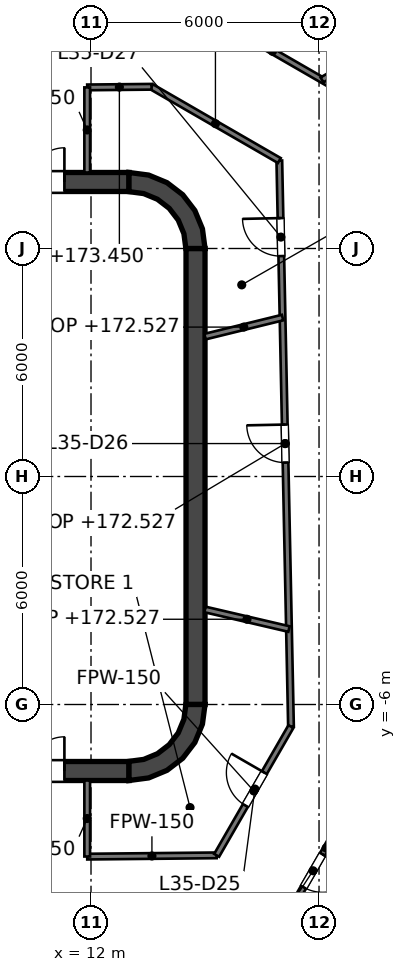
"""IFC4 building model, lengths in metres.
Left out: names, types, materials, properties, quantities, classifications, styles, units other than length and angle.
Written with IfcOpenShell. Run it as: python <this file> out.ifc"""

import sys

from ifc_helpers import new_model, si_unit, direction, frame, frame_2d, origin, place, context, subcontext, project, spatial, polyline, rectangle, outline, extrude, element, fill, save


model = new_model("IFC4")
c1 = context("Model", 3, precision=1e-05, world=origin(), true_north=direction((0.0, 1.0)))
c2 = subcontext(c1, "Body", "Model", "MODEL_VIEW")
j1 = project(units=[si_unit("LENGTHUNIT", "METRE"), si_unit("PLANEANGLEUNIT", "RADIAN")], contexts=[c1])
p1 = place(None, origin())
s1 = spatial("IfcSite", under=j1, at=p1, CompositionType="ELEMENT")
p2 = place(p1, origin())
s2 = spatial("IfcBuilding", under=s1, at=p2, CompositionType="ELEMENT")
p3 = place(p2, frame((0.0, 0.0, 169.6)))
s3 = spatial("IfcBuildingStorey", under=s2, at=p3, CompositionType="ELEMENT", Elevation=169.6)
p4 = place(p3, frame((-13.0, 7.75, 0.0), z_axis=(0.0, 0.0, 1.0), x_axis=(1.0, 0.0, 0.0)))
e1 = element("IfcWall", 1, at=p4, inside=s3, PredefinedType="SHEAR", context=c2, shape_type="SweptSolid", body=[
    extrude(rectangle(XDim=26.0, YDim=0.5, at=frame_2d((13.0, 0.0))), origin(), (0.0, 0.0, 1.0), 4.0),
])
p5 = place(p4, frame((1.7, 0.0, 0.0)))
e2 = element("IfcOpeningElement", 2, at=p5, cuts=e1, PredefinedType="OPENING", context=c2, shape_type="SweptSolid", body=[
    extrude(rectangle(XDim=1.8, YDim=2.1, at=frame_2d((0.9, 1.05))), frame((0.0, 0.25, 0.0), z_axis=(0.0, -1.0, 0.0), x_axis=(1.0, 0.0, 0.0)), (0.0, 0.0, 1.0), 0.5),
])
p6 = place(p4, frame((22.5, 0.0, 0.0)))
e3 = element("IfcOpeningElement", 3, at=p6, cuts=e1, PredefinedType="OPENING", context=c2, shape_type="SweptSolid", body=[
    extrude(rectangle(XDim=1.8, YDim=2.1, at=frame_2d((0.9, 1.05))), frame((0.0, 0.25, 0.0), z_axis=(0.0, -1.0, 0.0), x_axis=(1.0, 0.0, 0.0)), (0.0, 0.0, 1.0), 0.5),
])
p7 = place(p3, frame((-13.0, -7.75, 0.0), z_axis=(0.0, 0.0, 1.0), x_axis=(1.0, 0.0, 0.0)))
e4 = element("IfcWall", 4, at=p7, inside=s3, PredefinedType="SHEAR", context=c2, shape_type="SweptSolid", body=[
    extrude(rectangle(XDim=26.0, YDim=0.5, at=frame_2d((13.0, 0.0))), origin(), (0.0, 0.0, 1.0), 4.0),
])
p8 = place(p7, frame((1.7, 0.0, 0.0)))
e5 = element("IfcOpeningElement", 5, at=p8, cuts=e4, PredefinedType="OPENING", context=c2, shape_type="SweptSolid", body=[
    extrude(rectangle(XDim=1.8, YDim=2.1, at=frame_2d((0.9, 1.05))), frame((0.0, 0.25, 0.0), z_axis=(0.0, -1.0, 0.0), x_axis=(1.0, 0.0, 0.0)), (0.0, 0.0, 1.0), 0.5),
])
p9 = place(p7, frame((22.5, 0.0, 0.0)))
e6 = element("IfcOpeningElement", 6, at=p9, cuts=e4, PredefinedType="OPENING", context=c2, shape_type="SweptSolid", body=[
    extrude(rectangle(XDim=1.8, YDim=2.1, at=frame_2d((0.9, 1.05))), frame((0.0, 0.25, 0.0), z_axis=(0.0, -1.0, 0.0), x_axis=(1.0, 0.0, 0.0)), (0.0, 0.0, 1.0), 0.5),
])
p10 = place(p3, frame((14.75, -6.0, 0.0), z_axis=(0.0, 0.0, 1.0), x_axis=(0.0, 1.0, 0.0)))
e7 = element("IfcWall", 7, at=p10, inside=s3, PredefinedType="SHEAR", context=c2, shape_type="SweptSolid", body=[
    extrude(rectangle(XDim=12.0, YDim=0.5, at=frame_2d((6.0, 0.0))), origin(), (0.0, 0.0, 1.0), 4.0),
])
p11 = place(p3, origin())
e8 = element("IfcWall", 8, at=p11, inside=s3, PredefinedType="SHEAR", context=c2, shape_type="SweptSolid", body=[
    extrude(outline(polyline([(13.0, 8.0), (13.0, 7.496), (13.387, 7.445), (13.748, 7.295), (14.058, 7.058), (14.295, 6.748), (14.445, 6.387), (14.496, 6.0), (15.0, 6.0), (14.932, 6.518), (14.732, 7.0), (14.414, 7.414), (14.0, 7.732), (13.518, 7.932), (13.0, 8.0)])), origin(), (0.0, 0.0, 1.0), 4.0),
])
e9 = element("IfcWall", 9, at=p11, inside=s3, PredefinedType="SHEAR", context=c2, shape_type="SweptSolid", body=[
    extrude(outline(polyline([(15.0, -6.0), (14.496, -6.0), (14.445, -6.387), (14.295, -6.748), (14.058, -7.058), (13.748, -7.295), (13.387, -7.445), (13.0, -7.496), (13.0, -8.0), (13.518, -7.932), (14.0, -7.732), (14.414, -7.414), (14.732, -7.0), (14.932, -6.518), (15.0, -6.0)])), origin(), (0.0, 0.0, 1.0), 4.0),
])
p12 = place(p3, frame((11.8, -7.5, 0.0), z_axis=(0.0, 0.0, 1.0), x_axis=(0.0, 1.0, 0.0)))
e10 = element("IfcWall", 10, at=p12, inside=s3, PredefinedType="SOLIDWALL", context=c2, shape_type="SweptSolid", body=[
    extrude(rectangle(XDim=15.0, YDim=0.4, at=frame_2d((7.5, 0.0))), origin(), (0.0, 0.0, 1.0), 3.85),
])
p13 = place(p12, frame((11.3, 0.0, 0.0)))
e11 = element("IfcOpeningElement", 11, at=p13, cuts=e10, PredefinedType="OPENING", context=c2, shape_type="SweptSolid", body=[
    extrude(rectangle(XDim=1.1, YDim=2.1, at=frame_2d((0.55, 1.05))), frame((0.0, 0.2, 0.0), z_axis=(0.0, -1.0, 0.0), x_axis=(1.0, 0.0, 0.0)), (0.0, 0.0, 1.0), 0.4),
])
p14 = place(p12, frame((8.4, 0.0, 0.0)))
e12 = element("IfcOpeningElement", 12, at=p14, cuts=e10, PredefinedType="OPENING", context=c2, shape_type="SweptSolid", body=[
    extrude(rectangle(XDim=1.1, YDim=2.1, at=frame_2d((0.55, 1.05))), frame((0.0, 0.2, 0.0), z_axis=(0.0, -1.0, 0.0), x_axis=(1.0, 0.0, 0.0)), (0.0, 0.0, 1.0), 0.4),
])
p15 = place(p12, frame((5.5, 0.0, 0.0)))
e13 = element("IfcOpeningElement", 13, at=p15, cuts=e10, PredefinedType="OPENING", context=c2, shape_type="SweptSolid", body=[
    extrude(rectangle(XDim=1.1, YDim=2.1, at=frame_2d((0.55, 1.05))), frame((0.0, 0.2, 0.0), z_axis=(0.0, -1.0, 0.0), x_axis=(1.0, 0.0, 0.0)), (0.0, 0.0, 1.0), 0.4),
])
p16 = place(p12, frame((13.697, 0.0, 0.0)))
e14 = element("IfcOpeningElement", 14, at=p16, cuts=e10, PredefinedType="OPENING", context=c2, shape_type="SweptSolid", body=[
    extrude(rectangle(XDim=0.9, YDim=2.1, at=frame_2d((0.45, 1.05))), frame((0.0, 0.2, 0.0), z_axis=(0.0, -1.0, 0.0), x_axis=(1.0, 0.0, 0.0)), (0.0, 0.0, 1.0), 0.4),
])
p17 = place(p12, frame((0.403, 0.0, 0.0)))
e15 = element("IfcOpeningElement", 15, at=p17, cuts=e10, PredefinedType="OPENING", context=c2, shape_type="SweptSolid", body=[
    extrude(rectangle(XDim=0.9, YDim=2.1, at=frame_2d((0.45, 1.05))), frame((0.0, 0.2, 0.0), z_axis=(0.0, -1.0, 0.0), x_axis=(1.0, 0.0, 0.0)), (0.0, 0.0, 1.0), 0.4),
])
e16 = element("IfcWall", 16, at=p11, inside=s3, PredefinedType="SOLIDWALL", context=c2, shape_type="SweptSolid", body=[
    extrude(outline(polyline([(12.0, -5.675), (12.0, -5.925), (14.25, -5.925), (14.5, -5.925), (14.5, -5.675), (14.5, -3.025), (14.5, -2.775), (14.5, -0.125), (14.5, 0.125), (14.5, 2.775), (14.5, 3.025), (14.5, 5.675), (14.5, 5.925), (14.25, 5.925), (12.0, 5.925), (12.0, 5.675), (14.25, 5.675), (14.25, 3.025), (12.0, 3.025), (12.0, 2.775), (14.25, 2.775), (14.25, 0.125), (12.0, 0.125), (12.0, -0.125), (14.25, -0.125), (14.25, -2.775), (12.0, -2.775), (12.0, -3.025), (14.25, -3.025), (14.25, -5.675), (12.0, -5.675)])), origin(), (0.0, 0.0, 1.0), 3.85),
])
p18 = place(p3, frame((16.955, 8.314, 0.0), z_axis=(0.0, 0.0, 1.0), x_axis=(0.020631568882, -0.999787146529, 0.0)))
e17 = element("IfcWall", 17, at=p18, inside=s3, PredefinedType="PARTITIONING", context=c2, shape_type="SweptSolid", body=[
    extrude(rectangle(XDim=14.898, YDim=0.15, at=frame_2d((7.449, 0.0))), origin(), (0.0, 0.0, 1.0), 2.927),
])
p19 = place(p18, frame((6.949, 0.0, 0.0)))
e18 = element("IfcOpeningElement", 18, at=p19, cuts=e17, PredefinedType="OPENING", context=c2, shape_type="SweptSolid", body=[
    extrude(rectangle(XDim=1.0, YDim=2.1, at=frame_2d((0.5, 1.05))), frame((0.0, 0.075, 0.0), z_axis=(0.0, -1.0, 0.0), x_axis=(1.0, 0.0, 0.0)), (0.0, 0.0, 1.0), 0.15),
])
p20 = place(p18, frame((1.514, 0.0, 0.0)))
e19 = element("IfcOpeningElement", 19, at=p20, cuts=e17, PredefinedType="OPENING", context=c2, shape_type="SweptSolid", body=[
    extrude(rectangle(XDim=1.0, YDim=2.1, at=frame_2d((0.5, 1.05))), frame((0.0, 0.075, 0.0), z_axis=(0.0, -1.0, 0.0), x_axis=(1.0, 0.0, 0.0)), (0.0, 0.0, 1.0), 0.15),
])
p21 = place(p3, frame((13.593, 10.256, 0.0), z_axis=(0.0, 0.0, 1.0), x_axis=(0.86597823907, -0.500081682786, 0.0)))
e20 = element("IfcWall", 20, at=p21, inside=s3, PredefinedType="PARTITIONING", context=c2, shape_type="SweptSolid", body=[
    extrude(rectangle(XDim=3.883, YDim=0.15, at=frame_2d((1.941, 0.0))), origin(), (0.0, 0.0, 1.0), 2.995),
])
p22 = place(p3, frame((14.225, 12.662, 0.0), z_axis=(0.0, 0.0, 1.0), x_axis=(0.865969566972, -0.500096699728, 0.0)))
e21 = element("IfcWall", 21, at=p22, inside=s3, PredefinedType="PARTITIONING", context=c2, shape_type="SweptSolid", body=[
    extrude(rectangle(XDim=5.891, YDim=0.15, at=frame_2d((2.946, 0.0))), origin(), (0.0, 0.0, 1.0), 2.995),
])
p23 = place(p3, frame((15.0, -3.499, 0.0), z_axis=(0.0, 0.0, 1.0), x_axis=(0.973869783381, -0.22710712234, 0.0)))
e22 = element("IfcWall", 22, at=p23, inside=s3, PredefinedType="PARTITIONING", context=c2, shape_type="SweptSolid", body=[
    extrude(rectangle(XDim=2.268, YDim=0.15, at=frame_2d((1.134, 0.0))), origin(), (0.0, 0.0, 1.0), 2.927),
])
p24 = place(p3, frame((11.9, -10.003, 0.0), z_axis=(0.0, 0.0, 1.0), x_axis=(0.999951786456, 0.009819611121, 0.0)))
e23 = element("IfcWall", 23, at=p24, inside=s3, PredefinedType="PARTITIONING", context=c2, shape_type="SweptSolid", body=[
    extrude(rectangle(XDim=3.406, YDim=0.15, at=frame_2d((1.703, 0.0))), origin(), (0.0, 0.0, 1.0), 2.995),
])
p25 = place(p3, frame((11.9, 10.239, 0.0), z_axis=(0.0, 0.0, 1.0), x_axis=(0.999951931166, 0.009804863925, 0.0)))
e24 = element("IfcWall", 24, at=p25, inside=s3, PredefinedType="PARTITIONING", context=c2, shape_type="SweptSolid", body=[
    extrude(rectangle(XDim=1.693, YDim=0.15, at=frame_2d((0.847, 0.0))), origin(), (0.0, 0.0, 1.0), 3.85),
])
p26 = place(p3, frame((15.0, 3.681, 0.0), z_axis=(0.0, 0.0, 1.0), x_axis=(0.971118944767, 0.238595882433, 0.0)))
e25 = element("IfcWall", 25, at=p26, inside=s3, PredefinedType="PARTITIONING", context=c2, shape_type="SweptSolid", body=[
    extrude(rectangle(XDim=2.101, YDim=0.15, at=frame_2d((1.05, 0.0))), origin(), (0.0, 0.0, 1.0), 2.927),
])
p27 = place(p3, frame((18.078, 10.437, 0.0), z_axis=(0.0, 0.0, 1.0), x_axis=(0.865997546841, 0.500048246539, 0.0)))
e26 = element("IfcWall", 26, at=p27, inside=s3, PredefinedType="PARTITIONING", context=c2, shape_type="SweptSolid", body=[
    extrude(rectangle(XDim=7.698, YDim=0.15, at=frame_2d((3.849, 0.0))), origin(), (0.0, 0.0, 1.0), 3.152),
])
p28 = place(p3, frame((16.7, -12.355, 0.0), z_axis=(0.0, 0.0, 1.0), x_axis=(0.499651425435, 0.866226559891, 0.0)))
e27 = element("IfcWall", 27, at=p28, inside=s3, PredefinedType="PARTITIONING", context=c2, shape_type="SweptSolid", body=[
    extrude(rectangle(XDim=5.951, YDim=0.15, at=frame_2d((2.976, 0.0))), origin(), (0.0, 0.0, 1.0), 2.995),
])
p29 = place(p28, frame((1.786, 0.0, 0.0)))
e28 = element("IfcOpeningElement", 28, at=p29, cuts=e27, PredefinedType="OPENING", context=c2, shape_type="SweptSolid", body=[
    extrude(rectangle(XDim=1.0, YDim=2.1, at=frame_2d((0.5, 1.05))), frame((0.0, 0.075, 0.0), z_axis=(0.0, -1.0, 0.0), x_axis=(1.0, 0.0, 0.0)), (0.0, 0.0, 1.0), 0.15),
])
p30 = place(p3, frame((15.306, -9.969, 0.0), z_axis=(0.0, 0.0, 1.0), x_axis=(0.499690037699, 0.866204286658, 0.0)))
e29 = element("IfcWall", 29, at=p30, inside=s3, PredefinedType="PARTITIONING", context=c2, shape_type="SweptSolid", body=[
    extrude(rectangle(XDim=3.912, YDim=0.15, at=frame_2d((1.956, 0.0))), origin(), (0.0, 0.0, 1.0), 2.995),
])
p31 = place(p30, frame((1.513, 0.0, 0.0)))
e30 = element("IfcOpeningElement", 30, at=p31, cuts=e29, PredefinedType="OPENING", context=c2, shape_type="SweptSolid", body=[
    extrude(rectangle(XDim=1.0, YDim=2.1, at=frame_2d((0.5, 1.05))), frame((0.0, 0.075, 0.0), z_axis=(0.0, -1.0, 0.0), x_axis=(1.0, 0.0, 0.0)), (0.0, 0.0, 1.0), 0.15),
])
p32 = place(p3, frame((11.9, -10.0, 0.0), z_axis=(0.0, 0.0, 1.0), x_axis=(0.0, 1.0, 0.0)))
e31 = element("IfcWall", 31, at=p32, inside=s3, PredefinedType="PARTITIONING", context=c2, shape_type="SweptSolid", body=[
    extrude(rectangle(XDim=2.0, YDim=0.15, at=frame_2d((1.0, 0.0))), origin(), (0.0, 0.0, 1.0), 2.995),
])
p33 = place(p3, frame((11.9, 8.0, 0.0), z_axis=(0.0, 0.0, 1.0), x_axis=(0.0, 1.0, 0.0)))
e32 = element("IfcWall", 32, at=p33, inside=s3, PredefinedType="PARTITIONING", context=c2, shape_type="SweptSolid", body=[
    extrude(rectangle(XDim=2.239, YDim=0.15, at=frame_2d((1.12, 0.0))), origin(), (0.0, 0.0, 1.0), 2.995),
])
p34 = place(p13, origin())
e33 = element("IfcDoor", 33, at=p34, inside=s3, OperationType="DOUBLE_DOOR_SLIDING", PredefinedType="DOOR", context=c2, shape_type="SweptSolid", body=[
    extrude(rectangle(XDim=1.1, YDim=2.1, at=frame_2d((0.55, 1.05))), frame((0.0, 0.025, 0.0), z_axis=(0.0, -1.0, 0.0), x_axis=(1.0, 0.0, 0.0)), (0.0, 0.0, 1.0), 0.05),
])
fill(e11, e33)
p35 = place(p14, origin())
e34 = element("IfcDoor", 34, at=p35, inside=s3, OperationType="DOUBLE_DOOR_SLIDING", PredefinedType="DOOR", context=c2, shape_type="SweptSolid", body=[
    extrude(rectangle(XDim=1.1, YDim=2.1, at=frame_2d((0.55, 1.05))), frame((0.0, 0.025, 0.0), z_axis=(0.0, -1.0, 0.0), x_axis=(1.0, 0.0, 0.0)), (0.0, 0.0, 1.0), 0.05),
])
fill(e12, e34)
p36 = place(p15, origin())
e35 = element("IfcDoor", 35, at=p36, inside=s3, OperationType="DOUBLE_DOOR_SLIDING", PredefinedType="DOOR", context=c2, shape_type="SweptSolid", body=[
    extrude(rectangle(XDim=1.1, YDim=2.1, at=frame_2d((0.55, 1.05))), frame((0.0, 0.025, 0.0), z_axis=(0.0, -1.0, 0.0), x_axis=(1.0, 0.0, 0.0)), (0.0, 0.0, 1.0), 0.05),
])
fill(e13, e35)
p37 = place(p16, origin())
e36 = element("IfcDoor", 36, at=p37, inside=s3, OperationType="SINGLE_SWING_RIGHT", PredefinedType="DOOR", context=c2, shape_type="SweptSolid", body=[
    extrude(rectangle(XDim=0.9, YDim=2.1, at=frame_2d((0.45, 1.05))), frame((0.0, 0.025, 0.0), z_axis=(0.0, -1.0, 0.0), x_axis=(1.0, 0.0, 0.0)), (0.0, 0.0, 1.0), 0.05),
])
fill(e14, e36)
p38 = place(p17, origin())
e37 = element("IfcDoor", 37, at=p38, inside=s3, OperationType="SINGLE_SWING_RIGHT", PredefinedType="DOOR", context=c2, shape_type="SweptSolid", body=[
    extrude(rectangle(XDim=0.9, YDim=2.1, at=frame_2d((0.45, 1.05))), frame((0.0, 0.025, 0.0), z_axis=(0.0, -1.0, 0.0), x_axis=(1.0, 0.0, 0.0)), (0.0, 0.0, 1.0), 0.05),
])
fill(e15, e37)
p39 = place(p6, origin())
e38 = element("IfcDoor", 38, at=p39, inside=s3, OperationType="DOUBLE_DOOR_SINGLE_SWING", PredefinedType="DOOR", context=c2, shape_type="SweptSolid", body=[
    extrude(rectangle(XDim=1.8, YDim=2.1, at=frame_2d((0.9, 1.05))), frame((0.0, 0.025, 0.0), z_axis=(0.0, -1.0, 0.0), x_axis=(1.0, 0.0, 0.0)), (0.0, 0.0, 1.0), 0.05),
])
fill(e3, e38)
p40 = place(p9, origin())
e39 = element("IfcDoor", 39, at=p40, inside=s3, OperationType="DOUBLE_DOOR_SINGLE_SWING", PredefinedType="DOOR", context=c2, shape_type="SweptSolid", body=[
    extrude(rectangle(XDim=1.8, YDim=2.1, at=frame_2d((0.9, 1.05))), frame((0.0, 0.025, 0.0), z_axis=(0.0, -1.0, 0.0), x_axis=(1.0, 0.0, 0.0)), (0.0, 0.0, 1.0), 0.05),
])
fill(e6, e39)
p41 = place(p31, origin())
e40 = element("IfcDoor", 40, at=p41, inside=s3, OperationType="SINGLE_SWING_RIGHT", PredefinedType="DOOR", context=c2, shape_type="SweptSolid", body=[
    extrude(rectangle(XDim=1.0, YDim=2.1, at=frame_2d((0.5, 1.05))), frame((0.0, 0.025, 0.0), z_axis=(0.0, -1.0, 0.0), x_axis=(1.0, 0.0, 0.0)), (0.0, 0.0, 1.0), 0.05),
])
fill(e30, e40)
p42 = place(p19, origin())
e41 = element("IfcDoor", 41, at=p42, inside=s3, OperationType="SINGLE_SWING_LEFT", PredefinedType="DOOR", context=c2, shape_type="SweptSolid", body=[
    extrude(rectangle(XDim=1.0, YDim=2.1, at=frame_2d((0.5, 1.05))), frame((0.0, 0.025, 0.0), z_axis=(0.0, -1.0, 0.0), x_axis=(1.0, 0.0, 0.0)), (0.0, 0.0, 1.0), 0.05),
])
fill(e18, e41)
p43 = place(p20, origin())
e42 = element("IfcDoor", 42, at=p43, inside=s3, OperationType="SINGLE_SWING_LEFT", PredefinedType="DOOR", context=c2, shape_type="SweptSolid", body=[
    extrude(rectangle(XDim=1.0, YDim=2.1, at=frame_2d((0.5, 1.05))), frame((0.0, 0.025, 0.0), z_axis=(0.0, -1.0, 0.0), x_axis=(1.0, 0.0, 0.0)), (0.0, 0.0, 1.0), 0.05),
])
fill(e19, e42)
p44 = place(p29, origin())
e43 = element("IfcDoor", 43, at=p44, inside=s3, OperationType="SINGLE_SWING_RIGHT", PredefinedType="DOOR", context=c2, shape_type="SweptSolid", body=[
    extrude(rectangle(XDim=1.0, YDim=2.1, at=frame_2d((0.5, 1.05))), frame((0.0, 0.025, 0.0), z_axis=(0.0, -1.0, 0.0), x_axis=(1.0, 0.0, 0.0)), (0.0, 0.0, 1.0), 0.05),
])
fill(e28, e43)
save(model, sys.argv[1])
